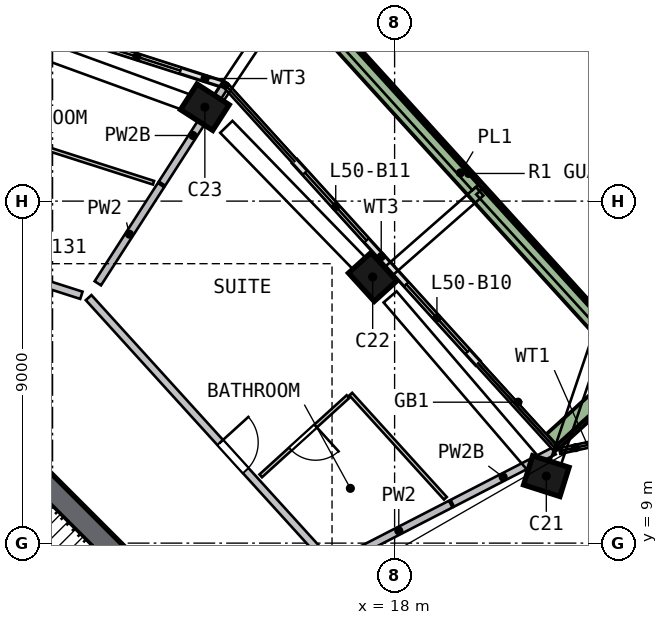
"""IFC4 building model, lengths in metres.
Left out: names, types, materials, properties, quantities, classifications, styles, units other than length and angle.
Written with IfcOpenShell. Run it as: python <this file> out.ifc"""

import sys

from ifc_helpers import new_model, si_unit, direction, frame, frame_2d, origin, origin_2d, place, context, subcontext, project, spatial, rectangle, extrude, element, fill, save


model = new_model("IFC4")
c1 = context("Model", 3, precision=1e-05, world=origin(), true_north=direction((0.0, 1.0)))
c2 = subcontext(c1, "Body", "Model", "MODEL_VIEW")
j1 = project(units=[si_unit("LENGTHUNIT", "METRE"), si_unit("PLANEANGLEUNIT", "RADIAN")], contexts=[c1])
p1 = place(None, origin())
s1 = spatial("IfcSite", under=j1, at=p1, CompositionType="ELEMENT")
p2 = place(p1, origin())
s2 = spatial("IfcBuilding", under=s1, at=p2, CompositionType="ELEMENT")
p3 = place(p2, frame((0.0, 0.0, 205.5)))
s3 = spatial("IfcBuildingStorey", under=s2, at=p3, CompositionType="ELEMENT", Elevation=205.5)
p4 = place(p3, frame((22.054, 10.637, 0.0), z_axis=(-0.051461458, 0.104443195, 0.993198539), x_axis=(0.951300961, -0.297545535, 0.080580003)))
e1 = element("IfcColumn", 1, at=p4, inside=s3, PredefinedType="COLUMN", context=c2, shape_type="SweptSolid", body=[
    extrude(rectangle(XDim=1.0, YDim=0.8, at=origin_2d()), origin(), (0.0, 0.0, 1.0), 3.212),
])
p5 = place(p3, frame((17.515, 15.904, 0.0), z_axis=(-0.076352583, 0.082664599, 0.993648251), x_axis=(-0.667977152, 0.735625089, -0.112526675)))
e2 = element("IfcColumn", 2, at=p5, inside=s3, PredefinedType="COLUMN", context=c2, shape_type="SweptSolid", body=[
    extrude(rectangle(XDim=1.0, YDim=0.8, at=origin_2d()), origin(), (0.0, 0.0, 1.0), 3.21),
])
p6 = place(p3, frame((13.125, 20.397, 0.0), z_axis=(-0.097538328, 0.061579147, 0.993324863), x_axis=(0.83540652, -0.537392943, 0.115346307)))
e3 = element("IfcColumn", 3, at=p6, inside=s3, PredefinedType="COLUMN", context=c2, shape_type="SweptSolid", body=[
    extrude(rectangle(XDim=1.0, YDim=0.8, at=origin_2d()), origin(), (0.0, 0.0, 1.0), 3.211),
])
p7 = place(p3, frame((13.788, 5.587, 0.0), z_axis=(0.0, 0.0, 1.0), x_axis=(-0.707106781, 0.707106781, 0.0)))
e4 = element("IfcWall", 4, at=p7, inside=s3, PredefinedType="SHEAR", context=c2, shape_type="SweptSolid", body=[
    extrude(rectangle(XDim=11.598, YDim=0.6, at=frame_2d((5.799, 0.0))), origin(), (0.0, 0.0, 1.0), 3.5),
])
p8 = place(p7, frame((2.099, 0.0, 0.0)))
e5 = element("IfcOpeningElement", 5, at=p8, cuts=e4, PredefinedType="OPENING", context=c2, shape_type="SweptSolid", body=[
    extrude(rectangle(XDim=1.2, YDim=2.1, at=frame_2d((0.6, 1.05))), frame((0.0, 0.31, 0.0), z_axis=(0.0, -1.0, 0.0), x_axis=(1.0, 0.0, 0.0)), (0.0, 0.0, 1.0), 0.62),
])
p9 = place(p3, frame((20.189, 13.74, 0.0), z_axis=(0.0, 0.0, 1.0), x_axis=(-0.672250944, 0.740323354, 0.0)))
e6 = element("IfcWall", 6, at=p9, inside=s3, PredefinedType="SOLIDWALL", context=c2, shape_type="SweptSolid", body=[
    extrude(rectangle(XDim=3.4, YDim=0.15, at=frame_2d((1.7, 0.0))), origin(), (0.0, 0.0, 1.0), 2.475),
])
p10 = place(p9, frame((0.4, 0.0, 0.0)))
e7 = element("IfcOpeningElement", 7, at=p10, cuts=e6, PredefinedType="OPENING", context=c2, shape_type="SweptSolid", body=[
    extrude(rectangle(XDim=2.4, YDim=2.4, at=frame_2d((1.2, 1.2))), frame((0.0, 0.085, 0.0), z_axis=(0.0, -1.0, 0.0), x_axis=(1.0, 0.0, 0.0)), (0.0, 0.0, 1.0), 0.17),
])
p11 = place(p3, frame((17.904, 16.257, 0.0), z_axis=(0.0, 0.0, 1.0), x_axis=(-0.672243001, 0.740330566, 0.0)))
e8 = element("IfcWall", 8, at=p11, inside=s3, PredefinedType="SOLIDWALL", context=c2, shape_type="SweptSolid", body=[
    extrude(rectangle(XDim=3.761, YDim=0.15, at=frame_2d((1.881, 0.0))), origin(), (0.0, 0.0, 1.0), 2.475),
])
p12 = place(p11, frame((0.961, 0.0, 0.0)))
e9 = element("IfcOpeningElement", 9, at=p12, cuts=e8, PredefinedType="OPENING", context=c2, shape_type="SweptSolid", body=[
    extrude(rectangle(XDim=2.4, YDim=2.4, at=frame_2d((1.2, 1.2))), frame((0.0, 0.085, 0.0), z_axis=(0.0, -1.0, 0.0), x_axis=(1.0, 0.0, 0.0)), (0.0, 0.0, 1.0), 0.17),
])
p13 = place(p3, frame((13.471, 21.079, 0.0), z_axis=(0.0, 0.0, 1.0), x_axis=(-0.952334788, 0.305054833, 0.0)))
e10 = element("IfcWall", 10, at=p13, inside=s3, PredefinedType="SOLIDWALL", context=c2, shape_type="SweptSolid", body=[
    extrude(rectangle(XDim=3.967, YDim=0.15, at=frame_2d((1.984, 0.0))), origin(), (0.0, 0.0, 1.0), 2.475),
])
p14 = place(p13, frame((1.167, 0.0, 0.0)))
e11 = element("IfcOpeningElement", 11, at=p14, cuts=e10, PredefinedType="OPENING", context=c2, shape_type="SweptSolid", body=[
    extrude(rectangle(XDim=2.4, YDim=2.4, at=frame_2d((1.2, 1.2))), frame((0.0, 0.085, 0.0), z_axis=(0.0, -1.0, 0.0), x_axis=(1.0, 0.0, 0.0)), (0.0, 0.0, 1.0), 0.17),
])
p15 = place(p3, frame((22.162, 11.681, 0.0), z_axis=(0.0, 0.0, 1.0), x_axis=(0.74028876, 0.672289039, 0.0)))
e12 = element("IfcWall", 12, at=p15, inside=s3, PredefinedType="SOLIDWALL", context=c2, shape_type="SweptSolid", body=[
    extrude(rectangle(XDim=3.199, YDim=0.5, at=frame_2d((1.6, 0.0))), origin(), (0.0, 0.0, 1.0), 0.7),
])
p16 = place(p3, frame((24.177, 13.848, 0.0), z_axis=(0.0, 0.0, 1.0), x_axis=(-0.672241691, 0.740331756, 0.0)))
e13 = element("IfcWall", 13, at=p16, inside=s3, PredefinedType="SOLIDWALL", context=c2, shape_type="SweptSolid", body=[
    extrude(rectangle(XDim=13.224, YDim=0.5, at=frame_2d((6.612, 0.0))), origin(), (0.0, 0.0, 1.0), 0.7),
])
p17 = place(p3, frame((3.24, 9.629, 0.0), z_axis=(0.0, 0.0, 1.0), x_axis=(0.707106781, -0.707106781, 0.0)))
e14 = element("IfcWall", 14, at=p17, inside=s3, PredefinedType="SOLIDWALL", context=c2, shape_type="SweptSolid", body=[
    extrude(rectangle(XDim=9.036, YDim=0.2, at=frame_2d((4.518, 0.0))), origin(), (0.0, 0.0, 1.0), 3.19),
])
p18 = place(p17, frame((7.018, 0.0, 0.0)))
e15 = element("IfcOpeningElement", 15, at=p18, cuts=e14, PredefinedType="OPENING", context=c2, shape_type="SweptSolid", body=[
    extrude(rectangle(XDim=1.2, YDim=2.1, at=frame_2d((0.6, 1.05))), frame((0.0, 0.11, 0.0), z_axis=(0.0, -1.0, 0.0), x_axis=(1.0, 0.0, 0.0)), (0.0, 0.0, 1.0), 0.22),
])
p19 = place(p3, frame((0.885, 18.363, 0.0), z_axis=(0.0, 0.0, 1.0), x_axis=(0.952343787, -0.305026737, 0.0)))
e16 = element("IfcWall", 16, at=p19, inside=s3, PredefinedType="SOLIDWALL", context=c2, shape_type="SweptSolid", body=[
    extrude(rectangle(XDim=9.317, YDim=0.2, at=frame_2d((4.658, 0.0))), origin(), (0.0, 0.0, 1.0), 3.19),
])
p20 = place(p19, frame((1.9, 0.0, 0.0)))
e17 = element("IfcOpeningElement", 17, at=p20, cuts=e16, PredefinedType="OPENING", context=c2, shape_type="SweptSolid", body=[
    extrude(rectangle(XDim=1.0, YDim=2.1, at=frame_2d((0.5, 1.05))), frame((0.0, 0.11, 0.0), z_axis=(0.0, -1.0, 0.0), x_axis=(1.0, 0.0, 0.0)), (0.0, 0.0, 1.0), 0.22),
])
p21 = place(p3, frame((9.948, 15.46, 0.0), z_axis=(0.0, 0.0, 1.0), x_axis=(0.672246163, -0.740327695, 0.0)))
e18 = element("IfcWall", 18, at=p21, inside=s3, PredefinedType="SOLIDWALL", context=c2, shape_type="SweptSolid", body=[
    extrude(rectangle(XDim=9.316, YDim=0.2, at=frame_2d((4.658, 0.0))), origin(), (0.0, 0.0, 1.0), 3.19),
])
p22 = place(p21, frame((5.15, 0.0, 0.0)))
e19 = element("IfcOpeningElement", 19, at=p22, cuts=e18, PredefinedType="OPENING", context=c2, shape_type="SweptSolid", body=[
    extrude(rectangle(XDim=1.0, YDim=2.1, at=frame_2d((0.5, 1.05))), frame((0.0, 0.11, 0.0), z_axis=(0.0, -1.0, 0.0), x_axis=(1.0, 0.0, 0.0)), (0.0, 0.0, 1.0), 0.22),
])
p23 = place(p3, frame((10.19, 15.837, 0.0), z_axis=(0.0, 0.0, 1.0), x_axis=(0.541122731, 0.840943631, 0.0)))
e20 = element("IfcWall", 20, at=p23, inside=s3, PredefinedType="SOLIDWALL", context=c2, shape_type="SweptSolid", body=[
    extrude(rectangle(XDim=3.075, YDim=0.2, at=frame_2d((1.537, 0.0))), origin(), (0.0, 0.0, 1.0), 3.19),
])
p24 = place(p3, frame((11.879, 18.461, 0.0), z_axis=(0.0, 0.0, 1.0), x_axis=(0.541138592, 0.840933425, 0.0)))
e21 = element("IfcWall", 21, at=p24, inside=s3, PredefinedType="SOLIDWALL", context=c2, shape_type="SweptSolid", body=[
    extrude(rectangle(XDim=3.011, YDim=0.2, at=frame_2d((1.506, 0.0))), origin(), (0.0, 0.0, 1.0), 2.69),
])
p25 = place(p3, frame((16.743, 8.62, 0.0), z_axis=(0.0, 0.0, 1.0), x_axis=(0.889125357, 0.45766374, 0.0)))
e22 = element("IfcWall", 22, at=p25, inside=s3, PredefinedType="SOLIDWALL", context=c2, shape_type="SweptSolid", body=[
    extrude(rectangle(XDim=3.075, YDim=0.2, at=frame_2d((1.537, 0.0))), origin(), (0.0, 0.0, 1.0), 3.19),
])
p26 = place(p3, frame((19.518, 10.048, 0.0), z_axis=(0.0, 0.0, 1.0), x_axis=(0.889095542, 0.457721659, 0.0)))
e23 = element("IfcWall", 23, at=p26, inside=s3, PredefinedType="SOLIDWALL", context=c2, shape_type="SweptSolid", body=[
    extrude(rectangle(XDim=3.011, YDim=0.2, at=frame_2d((1.506, 0.0))), origin(), (0.0, 0.0, 1.0), 2.69),
])
p27 = place(p3, frame((11.656, 18.484, 0.0), z_axis=(0.0, 0.0, 1.0), x_axis=(-0.952360606, 0.304974221, 0.0)))
e24 = element("IfcWall", 24, at=p27, inside=s3, PredefinedType="PARTITIONING", context=c2, shape_type="SweptSolid", body=[
    extrude(rectangle(XDim=3.704, YDim=0.1, at=frame_2d((1.852, 0.0))), origin(), (0.0, 0.0, 1.0), 3.19),
])
p28 = place(p3, frame((16.772, 12.854, 0.0), z_axis=(0.0, 0.0, 1.0), x_axis=(-0.74031058, -0.672265011, 0.0)))
e25 = element("IfcWall", 25, at=p28, inside=s3, PredefinedType="PARTITIONING", context=c2, shape_type="SweptSolid", body=[
    extrude(rectangle(XDim=3.1, YDim=0.1, at=frame_2d((1.55, 0.0))), origin(), (0.0, 0.0, 1.0), 3.19),
])
p29 = place(p28, frame((1.15, 0.0, 0.0)))
e26 = element("IfcOpeningElement", 26, at=p29, cuts=e25, PredefinedType="OPENING", context=c2, shape_type="SweptSolid", body=[
    extrude(rectangle(XDim=0.9, YDim=2.1, at=frame_2d((0.45, 1.05))), frame((0.0, 0.06, 0.0), z_axis=(0.0, -1.0, 0.0), x_axis=(1.0, 0.0, 0.0)), (0.0, 0.0, 1.0), 0.12),
])
p30 = place(p3, frame((16.846, 12.922, 0.0), z_axis=(0.0, 0.0, 1.0), x_axis=(0.672242906, -0.740330652, 0.0)))
e27 = element("IfcWall", 27, at=p30, inside=s3, PredefinedType="PARTITIONING", context=c2, shape_type="SweptSolid", body=[
    extrude(rectangle(XDim=3.704, YDim=0.1, at=frame_2d((1.852, 0.0))), origin(), (0.0, 0.0, 1.0), 3.19),
])
p31 = place(p10, origin())
e28 = element("IfcDoor", 28, at=p31, inside=s3, OperationType="SLIDING_TO_RIGHT", PredefinedType="DOOR", context=c2, shape_type="SweptSolid", body=[
    extrude(rectangle(XDim=2.4, YDim=2.4, at=frame_2d((1.2, 1.2))), frame((0.0, 0.025, 0.0), z_axis=(0.0, -1.0, 0.0), x_axis=(1.0, 0.0, 0.0)), (0.0, 0.0, 1.0), 0.05),
])
fill(e7, e28)
p32 = place(p12, origin())
e29 = element("IfcDoor", 29, at=p32, inside=s3, OperationType="SLIDING_TO_LEFT", PredefinedType="DOOR", context=c2, shape_type="SweptSolid", body=[
    extrude(rectangle(XDim=2.4, YDim=2.4, at=frame_2d((1.2, 1.2))), frame((0.0, 0.025, 0.0), z_axis=(0.0, -1.0, 0.0), x_axis=(1.0, 0.0, 0.0)), (0.0, 0.0, 1.0), 0.05),
])
fill(e9, e29)
p33 = place(p14, origin())
e30 = element("IfcDoor", 30, at=p33, inside=s3, OperationType="SLIDING_TO_LEFT", PredefinedType="DOOR", context=c2, shape_type="SweptSolid", body=[
    extrude(rectangle(XDim=2.4, YDim=2.4, at=frame_2d((1.2, 1.2))), frame((0.0, 0.025, 0.0), z_axis=(0.0, -1.0, 0.0), x_axis=(1.0, 0.0, 0.0)), (0.0, 0.0, 1.0), 0.05),
])
fill(e11, e30)
p34 = place(p22, origin())
e31 = element("IfcDoor", 31, at=p34, inside=s3, OperationType="SINGLE_SWING_LEFT", PredefinedType="DOOR", context=c2, shape_type="SweptSolid", body=[
    extrude(rectangle(XDim=1.0, YDim=2.1, at=frame_2d((0.5, 1.05))), frame((0.0, 0.025, 0.0), z_axis=(0.0, -1.0, 0.0), x_axis=(1.0, 0.0, 0.0)), (0.0, 0.0, 1.0), 0.05),
])
fill(e19, e31)
p35 = place(p29, origin())
e32 = element("IfcDoor", 32, at=p35, inside=s3, OperationType="SINGLE_SWING_LEFT", PredefinedType="DOOR", context=c2, shape_type="SweptSolid", body=[
    extrude(rectangle(XDim=0.9, YDim=2.1, at=frame_2d((0.45, 1.05))), frame((0.0, 0.025, 0.0), z_axis=(0.0, -1.0, 0.0), x_axis=(1.0, 0.0, 0.0)), (0.0, 0.0, 1.0), 0.05),
])
fill(e26, e32)
save(model, sys.argv[1])
